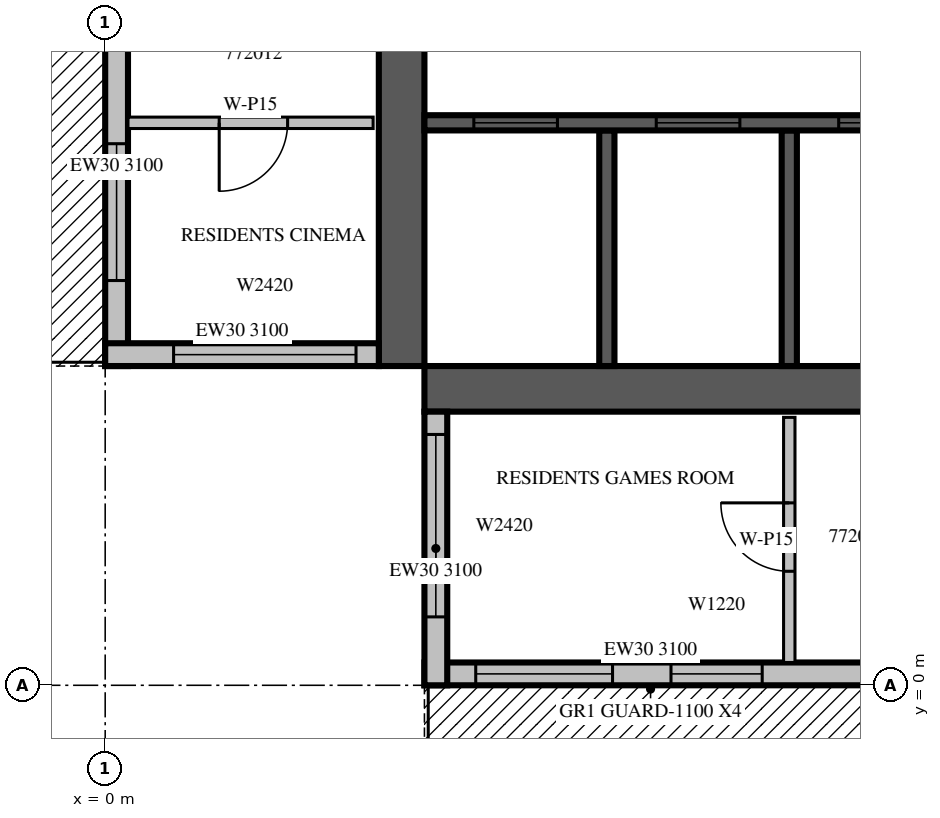
"""IFC4 building model, lengths in metres.
Left out: names, types, materials, properties, quantities, classifications, styles, units other than length and angle.
Written with IfcOpenShell. Run it as: python <this file> out.ifc"""

import sys

from ifc_helpers import new_model, si_unit, direction, frame, frame_2d, origin, place, context, subcontext, project, spatial, rectangle, extrude, source, transform, mapped, element, fill, save


model = new_model("IFC4")
c1 = context("Model", 3, precision=1e-05, world=origin(), true_north=direction((0.0, 1.0)))
c2 = subcontext(c1, "Body", "Model", "MODEL_VIEW")
j1 = project(units=[si_unit("LENGTHUNIT", "METRE"), si_unit("PLANEANGLEUNIT", "RADIAN")], contexts=[c1])
p1 = place(None, origin())
s1 = spatial("IfcSite", under=j1, at=p1, CompositionType="ELEMENT")
p2 = place(p1, origin())
s2 = spatial("IfcBuilding", under=s1, at=p2, CompositionType="ELEMENT")
p3 = place(p2, frame((0.0, 0.0, 312.5)))
s3 = spatial("IfcBuildingStorey", under=s2, at=p3, CompositionType="ELEMENT", Elevation=312.5)
m1 = source(origin(), c2, "Body", "SweptSolid", [
    extrude(rectangle(XDim=17.4, YDim=0.6, at=frame_2d((8.7, 0.0))), origin(), (0.0, 0.0, 1.0), 3.5),
])
p4 = place(p3, frame((3.9, 4.2, 0.0), z_axis=(0.0, 0.0, 1.0), x_axis=(0.0, 1.0, 0.0)))
e1 = element("IfcWall", 1, at=p4, inside=s3, PredefinedType="SHEAR", context=c2, shape_type="MappedRepresentation", body=[
    mapped(m1, transform((0.0, 0.0, 0.0), scale=1.0)),
])
m2 = source(origin(), c2, "Body", "SweptSolid", [
    extrude(rectangle(XDim=2.2, YDim=2.1, at=frame_2d((1.1, 1.05))), frame((0.0, 0.31, 0.0), z_axis=(0.0, -1.0, 0.0), x_axis=(1.0, 0.0, 0.0)), (0.0, 0.0, 1.0), 0.62),
])
p5 = place(p4, frame((4.2, 0.0, 0.0)))
e2 = element("IfcOpeningElement", 2, at=p5, cuts=e1, PredefinedType="OPENING", context=c2, shape_type="MappedRepresentation", body=[
    mapped(m2, transform((0.0, 0.0, 0.0), scale=1.0)),
])
p6 = place(p3, frame((4.2, 3.9, 0.0), z_axis=(0.0, 0.0, 1.0), x_axis=(1.0, 0.0, 0.0)))
e3 = element("IfcWall", 3, at=p6, inside=s3, PredefinedType="SHEAR", context=c2, shape_type="MappedRepresentation", body=[
    mapped(m1, transform((0.0, 0.0, 0.0), scale=1.0)),
])
m3 = source(origin(), c2, "Body", "SweptSolid", [
    extrude(rectangle(XDim=0.9, YDim=2.1, at=frame_2d((0.45, 1.05))), frame((0.0, 0.31, 0.0), z_axis=(0.0, -1.0, 0.0), x_axis=(1.0, 0.0, 0.0)), (0.0, 0.0, 1.0), 0.62),
])
p7 = place(p6, frame((14.0, 0.0, 0.0)))
e4 = element("IfcOpeningElement", 4, at=p7, cuts=e3, PredefinedType="OPENING", context=c2, shape_type="MappedRepresentation", body=[
    mapped(m3, transform((0.0, 0.0, 0.0), scale=1.0)),
])
m4 = source(origin(), c2, "Body", "SweptSolid", [
    extrude(rectangle(XDim=5.95, YDim=0.3, at=frame_2d((2.975, 0.0))), origin(), (0.0, 0.0, 1.0), 3.1),
])
p8 = place(p3, frame((4.2, 0.15, 0.0), z_axis=(0.0, 0.0, 1.0), x_axis=(1.0, 0.0, 0.0)))
e5 = element("IfcWall", 5, at=p8, inside=s3, PredefinedType="STANDARD", context=c2, shape_type="MappedRepresentation", body=[
    mapped(m4, transform((0.0, 0.0, 0.0), scale=1.0)),
])
m5 = source(origin(), c2, "Body", "SweptSolid", [
    extrude(rectangle(XDim=1.8, YDim=2.4, at=frame_2d((0.9, 1.2))), frame((0.0, 0.16, 0.0), z_axis=(0.0, -1.0, 0.0), x_axis=(1.0, 0.0, 0.0)), (0.0, 0.0, 1.0), 0.32),
])
p9 = place(p8, frame((0.675, 0.0, 0.0)))
e6 = element("IfcOpeningElement", 6, at=p9, cuts=e5, PredefinedType="OPENING", context=c2, shape_type="MappedRepresentation", body=[
    mapped(m5, transform((0.0, 0.0, 0.0), scale=1.0)),
])
m6 = source(origin(), c2, "Body", "SweptSolid", [
    extrude(rectangle(XDim=1.2, YDim=2.0, at=frame_2d((0.6, 1.0))), frame((0.0, 0.16, 0.0), z_axis=(0.0, -1.0, 0.0), x_axis=(1.0, 0.0, 0.0)), (0.0, 0.0, 1.0), 0.32),
])
p10 = place(p8, frame((3.244, 0.0, 0.6)))
e7 = element("IfcOpeningElement", 7, at=p10, cuts=e5, PredefinedType="OPENING", context=c2, shape_type="MappedRepresentation", body=[
    mapped(m6, transform((0.0, 0.0, 0.0), scale=1.0)),
])
m7 = source(origin(), c2, "Body", "SweptSolid", [
    extrude(rectangle(XDim=5.25, YDim=0.3, at=frame_2d((2.625, 0.0))), origin(), (0.0, 0.0, 1.0), 3.1),
])
p11 = place(p3, frame((0.15, 9.45, 0.0), z_axis=(0.0, 0.0, 1.0), x_axis=(0.0, -1.0, 0.0)))
e8 = element("IfcWall", 8, at=p11, inside=s3, PredefinedType="STANDARD", context=c2, shape_type="MappedRepresentation", body=[
    mapped(m7, transform((0.0, 0.0, 0.0), scale=1.0)),
])
p12 = place(p11, frame((2.325, 0.0, 0.0)))
e9 = element("IfcOpeningElement", 9, at=p12, cuts=e8, PredefinedType="OPENING", context=c2, shape_type="MappedRepresentation", body=[
    mapped(m5, transform((0.0, 0.0, 0.0), scale=1.0)),
])
m8 = source(origin(), c2, "Body", "SweptSolid", [
    extrude(rectangle(XDim=3.6, YDim=0.3, at=frame_2d((1.8, 0.0))), origin(), (0.0, 0.0, 1.0), 3.1),
])
p13 = place(p3, frame((0.0, 4.35, 0.0), z_axis=(0.0, 0.0, 1.0), x_axis=(1.0, 0.0, 0.0)))
e10 = element("IfcWall", 10, at=p13, inside=s3, PredefinedType="STANDARD", context=c2, shape_type="MappedRepresentation", body=[
    mapped(m8, transform((0.0, 0.0, 0.0), scale=1.0)),
])
m9 = source(origin(), c2, "Body", "SweptSolid", [
    extrude(rectangle(XDim=2.4, YDim=2.0, at=frame_2d((1.2, 1.0))), frame((0.0, 0.16, 0.0), z_axis=(0.0, -1.0, 0.0), x_axis=(1.0, 0.0, 0.0)), (0.0, 0.0, 1.0), 0.32),
])
p14 = place(p13, frame((0.9, 0.0, 0.6)))
e11 = element("IfcOpeningElement", 11, at=p14, cuts=e10, PredefinedType="OPENING", context=c2, shape_type="MappedRepresentation", body=[
    mapped(m9, transform((0.0, 0.0, 0.0), scale=1.0)),
])
p15 = place(p3, frame((4.35, 3.6, 0.0), z_axis=(0.0, 0.0, 1.0), x_axis=(0.0, -1.0, 0.0)))
e12 = element("IfcWall", 12, at=p15, inside=s3, PredefinedType="STANDARD", context=c2, shape_type="MappedRepresentation", body=[
    mapped(m8, transform((0.0, 0.0, 0.0), scale=1.0)),
])
p16 = place(p15, frame((0.3, 0.0, 0.6)))
e13 = element("IfcOpeningElement", 13, at=p16, cuts=e12, PredefinedType="OPENING", context=c2, shape_type="MappedRepresentation", body=[
    mapped(m9, transform((0.0, 0.0, 0.0), scale=1.0)),
])
m10 = source(origin(), c2, "Body", "SweptSolid", [
    extrude(rectangle(XDim=3.1, YDim=0.2, at=frame_2d((1.55, 0.0))), origin(), (0.0, 0.0, 1.0), 3.5),
])
for number, where, z_axis, x_axis in (
    (14, (6.6, 4.2, 0.0), (0.0, 0.0, 1.0), (0.0, 1.0, 0.0)),
    (15, (9.0, 4.2, 0.0), (0.0, 0.0, 1.0), (0.0, 1.0, 0.0)),
):
    element("IfcWall", number, at=place(p3, frame(where, z_axis=z_axis, x_axis=x_axis)), inside=s3, PredefinedType="SOLIDWALL", context=c2, shape_type="MappedRepresentation", body=[
        mapped(m10, transform((0.0, 0.0, 0.0), scale=1.0)),
    ])
m11 = source(origin(), c2, "Body", "SweptSolid", [
    extrude(rectangle(XDim=9.6, YDim=0.2, at=frame_2d((4.8, 0.0))), origin(), (0.0, 0.0, 1.0), 3.5),
])
p17 = place(p3, frame((4.2, 7.4, 0.0), z_axis=(0.0, 0.0, 1.0), x_axis=(1.0, 0.0, 0.0)))
e16 = element("IfcWall", 16, at=p17, inside=s3, PredefinedType="SOLIDWALL", context=c2, shape_type="MappedRepresentation", body=[
    mapped(m11, transform((0.0, 0.0, 0.0), scale=1.0)),
])
m12 = source(origin(), c2, "Body", "SweptSolid", [
    extrude(rectangle(XDim=1.1, YDim=2.1, at=frame_2d((0.55, 1.05))), frame((0.0, 0.11, 0.0), z_axis=(0.0, -1.0, 0.0), x_axis=(1.0, 0.0, 0.0)), (0.0, 0.0, 1.0), 0.22),
])
p18 = place(p17, frame((0.65, 0.0, 0.0)))
e17 = element("IfcOpeningElement", 17, at=p18, cuts=e16, PredefinedType="OPENING", context=c2, shape_type="MappedRepresentation", body=[
    mapped(m12, transform((0.0, 0.0, 0.0), scale=1.0)),
])
p19 = place(p17, frame((3.05, 0.0, 0.0)))
e18 = element("IfcOpeningElement", 18, at=p19, cuts=e16, PredefinedType="OPENING", context=c2, shape_type="MappedRepresentation", body=[
    mapped(m12, transform((0.0, 0.0, 0.0), scale=1.0)),
])
p20 = place(p17, frame((5.45, 0.0, 0.0)))
e19 = element("IfcOpeningElement", 19, at=p20, cuts=e16, PredefinedType="OPENING", context=c2, shape_type="MappedRepresentation", body=[
    mapped(m12, transform((0.0, 0.0, 0.0), scale=1.0)),
])
p21 = place(p17, frame((7.85, 0.0, 0.0)))
e20 = element("IfcOpeningElement", 20, at=p21, cuts=e16, PredefinedType="OPENING", context=c2, shape_type="MappedRepresentation", body=[
    mapped(m12, transform((0.0, 0.0, 0.0), scale=1.0)),
])
m13 = source(origin(), c2, "Body", "SweptSolid", [
    extrude(rectangle(XDim=3.225, YDim=0.15, at=frame_2d((1.613, 0.0))), origin(), (0.0, 0.0, 1.0), 3.1),
])
p22 = place(p3, frame((9.0, 3.525, 0.0), z_axis=(0.0, 0.0, 1.0), x_axis=(0.0, -1.0, 0.0)))
e21 = element("IfcWall", 21, at=p22, inside=s3, PredefinedType="PARTITIONING", context=c2, shape_type="MappedRepresentation", body=[
    mapped(m13, transform((0.0, 0.0, 0.0), scale=1.0)),
])
m14 = source(origin(), c2, "Body", "SweptSolid", [
    extrude(rectangle(XDim=0.9, YDim=2.1, at=frame_2d((0.45, 1.05))), frame((0.0, 0.085, 0.0), z_axis=(0.0, -1.0, 0.0), x_axis=(1.0, 0.0, 0.0)), (0.0, 0.0, 1.0), 0.17),
])
p23 = place(p22, frame((1.125, 0.0, 0.0)))
e22 = element("IfcOpeningElement", 22, at=p23, cuts=e21, PredefinedType="OPENING", context=c2, shape_type="MappedRepresentation", body=[
    mapped(m14, transform((0.0, 0.0, 0.0), scale=1.0)),
])
p24 = place(p3, frame((0.3, 7.4, 0.0), z_axis=(0.0, 0.0, 1.0), x_axis=(1.0, 0.0, 0.0)))
e23 = element("IfcWall", 23, at=p24, inside=s3, PredefinedType="PARTITIONING", context=c2, shape_type="MappedRepresentation", body=[
    mapped(m13, transform((0.0, 0.0, 0.0), scale=1.0)),
])
p25 = place(p24, frame((1.2, 0.0, 0.0)))
e24 = element("IfcOpeningElement", 24, at=p25, cuts=e23, PredefinedType="OPENING", context=c2, shape_type="MappedRepresentation", body=[
    mapped(m14, transform((0.0, 0.0, 0.0), scale=1.0)),
])
m15 = source(origin(), c2, "Body", "SweptSolid", [
    extrude(rectangle(XDim=1.8, YDim=2.4, at=frame_2d((0.9, 1.2))), frame((0.0, 0.025, 0.0), z_axis=(0.0, -1.0, 0.0), x_axis=(1.0, 0.0, 0.0)), (0.0, 0.0, 1.0), 0.05),
])
p26 = place(p9, origin())
e25 = element("IfcDoor", 25, at=p26, inside=s3, OperationType="SLIDING_TO_LEFT", PredefinedType="DOOR", context=c2, shape_type="MappedRepresentation", body=[
    mapped(m15, transform((0.0, 0.0, 0.0), scale=1.0)),
])
fill(e6, e25)
m16 = source(origin(), c2, "Body", "SweptSolid", [
    extrude(rectangle(XDim=1.2, YDim=2.0, at=frame_2d((0.6, 1.0))), frame((0.0, 0.03, 0.0), z_axis=(0.0, -1.0, 0.0), x_axis=(1.0, 0.0, 0.0)), (0.0, 0.0, 1.0), 0.06),
])
p27 = place(p10, origin())
e26 = element("IfcWindow", 26, at=p27, inside=s3, PartitioningType="SINGLE_PANEL", PredefinedType="WINDOW", context=c2, shape_type="MappedRepresentation", body=[
    mapped(m16, transform((0.0, 0.0, 0.0), scale=1.0)),
])
fill(e7, e26)
p28 = place(p12, origin())
e27 = element("IfcDoor", 27, at=p28, inside=s3, OperationType="SLIDING_TO_LEFT", PredefinedType="DOOR", context=c2, shape_type="MappedRepresentation", body=[
    mapped(m15, transform((0.0, 0.0, 0.0), scale=1.0)),
])
fill(e9, e27)
m17 = source(origin(), c2, "Body", "SweptSolid", [
    extrude(rectangle(XDim=2.4, YDim=2.0, at=frame_2d((1.2, 1.0))), frame((0.0, 0.03, 0.0), z_axis=(0.0, -1.0, 0.0), x_axis=(1.0, 0.0, 0.0)), (0.0, 0.0, 1.0), 0.06),
])
p29 = place(p14, origin())
e28 = element("IfcWindow", 28, at=p29, inside=s3, PartitioningType="SINGLE_PANEL", PredefinedType="WINDOW", context=c2, shape_type="MappedRepresentation", body=[
    mapped(m17, transform((0.0, 0.0, 0.0), scale=1.0)),
])
fill(e11, e28)
p30 = place(p16, origin())
e29 = element("IfcWindow", 29, at=p30, inside=s3, PartitioningType="SINGLE_PANEL", PredefinedType="WINDOW", context=c2, shape_type="MappedRepresentation", body=[
    mapped(m17, transform((0.0, 0.0, 0.0), scale=1.0)),
])
fill(e13, e29)
m18 = source(origin(), c2, "Body", "SweptSolid", [
    extrude(rectangle(XDim=1.1, YDim=2.1, at=frame_2d((0.55, 1.05))), frame((0.0, 0.025, 0.0), z_axis=(0.0, -1.0, 0.0), x_axis=(1.0, 0.0, 0.0)), (0.0, 0.0, 1.0), 0.05),
])
p31 = place(p18, origin())
e30 = element("IfcDoor", 30, at=p31, inside=s3, OperationType="SLIDING_TO_LEFT", PredefinedType="DOOR", context=c2, shape_type="MappedRepresentation", body=[
    mapped(m18, transform((0.0, 0.0, 0.0), scale=1.0)),
])
fill(e17, e30)
p32 = place(p19, origin())
e31 = element("IfcDoor", 31, at=p32, inside=s3, OperationType="SLIDING_TO_LEFT", PredefinedType="DOOR", context=c2, shape_type="MappedRepresentation", body=[
    mapped(m18, transform((0.0, 0.0, 0.0), scale=1.0)),
])
fill(e18, e31)
p33 = place(p20, origin())
e32 = element("IfcDoor", 32, at=p33, inside=s3, OperationType="SLIDING_TO_LEFT", PredefinedType="DOOR", context=c2, shape_type="MappedRepresentation", body=[
    mapped(m18, transform((0.0, 0.0, 0.0), scale=1.0)),
])
fill(e19, e32)
m19 = source(origin(), c2, "Body", "SweptSolid", [
    extrude(rectangle(XDim=0.9, YDim=2.1, at=frame_2d((0.45, 1.05))), frame((0.0, 0.025, 0.0), z_axis=(0.0, -1.0, 0.0), x_axis=(1.0, 0.0, 0.0)), (0.0, 0.0, 1.0), 0.05),
])
p34 = place(p23, origin())
e33 = element("IfcDoor", 33, at=p34, inside=s3, OperationType="SINGLE_SWING_RIGHT", PredefinedType="DOOR", context=c2, shape_type="MappedRepresentation", body=[
    mapped(m19, transform((0.0, 0.0, 0.0), scale=1.0)),
])
fill(e22, e33)
p35 = place(p25, origin())
e34 = element("IfcDoor", 34, at=p35, inside=s3, OperationType="SINGLE_SWING_RIGHT", PredefinedType="DOOR", context=c2, shape_type="MappedRepresentation", body=[
    mapped(m19, transform((0.0, 0.0, 0.0), scale=1.0)),
])
fill(e24, e34)
save(model, sys.argv[1])
